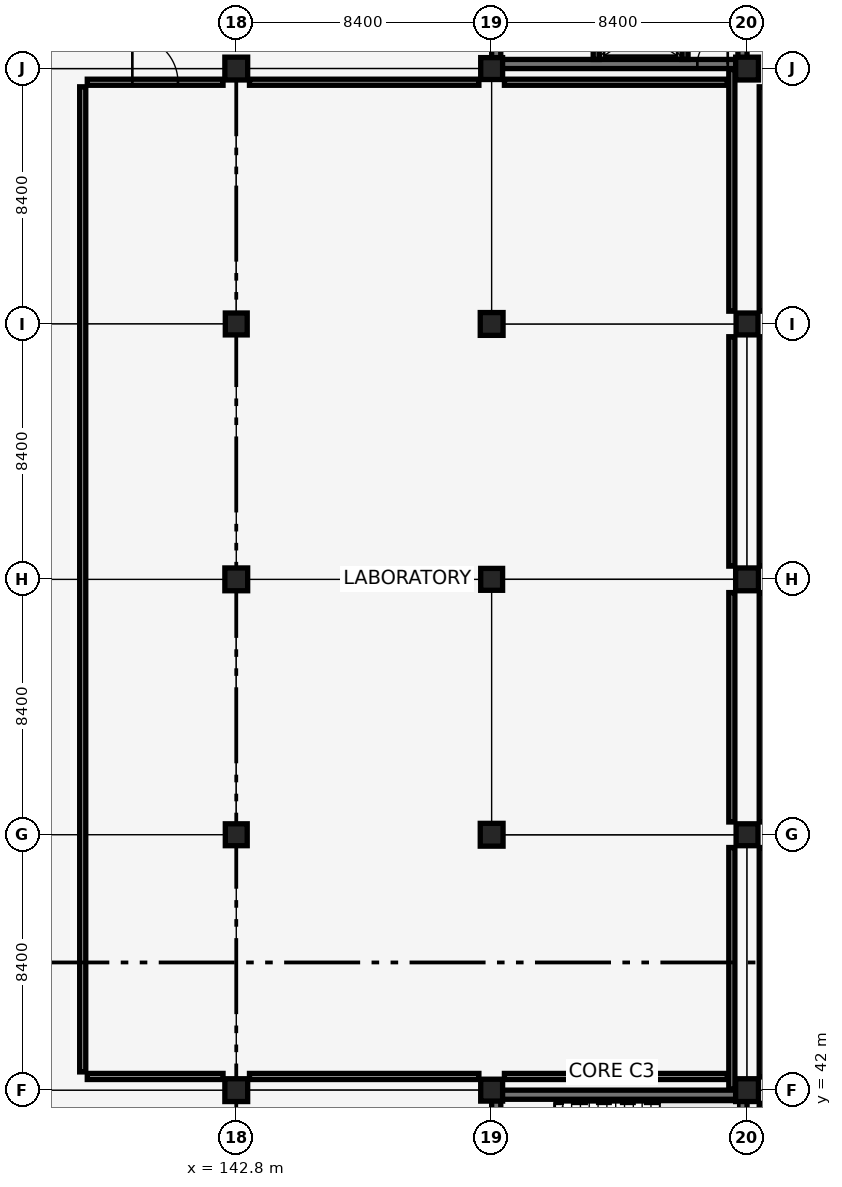
"""IFC4 building model, lengths in metres.
Left out: names, types, materials, properties, quantities, classifications, styles, units other than length and angle.
Written with IfcOpenShell. Run it as: python <this file> out.ifc"""

import sys

from ifc_helpers import new_model, si_unit, direction, frame, frame_2d, origin, origin_2d, place, context, subcontext, project, spatial, rectangle, extrude, element, fill, save


model = new_model("IFC4")
c1 = context("Model", 3, precision=1e-05, world=origin(), true_north=direction((0.0, 1.0)))
c2 = subcontext(c1, "Body", "Model", "MODEL_VIEW")
j1 = project(units=[si_unit("LENGTHUNIT", "METRE"), si_unit("PLANEANGLEUNIT", "RADIAN")], contexts=[c1])
p1 = place(None, origin())
s1 = spatial("IfcSite", under=j1, at=p1, CompositionType="ELEMENT")
p2 = place(p1, origin())
s2 = spatial("IfcBuilding", under=s1, at=p2, CompositionType="ELEMENT")
p3 = place(p2, frame((0.0, 0.0, 5.44)))
s3 = spatial("IfcBuildingStorey", under=s2, at=p3, CompositionType="ELEMENT", Elevation=5.44)
p4 = place(p3, frame((151.35, 41.85, 0.0), z_axis=(0.0, 0.0, 1.0), x_axis=(1.0, 0.0, 0.0)))
e1 = element("IfcWall", 1, at=p4, inside=s3, PredefinedType="SHEAR", context=c2, shape_type="SweptSolid", body=[
    extrude(rectangle(XDim=8.1, YDim=0.3, at=frame_2d((4.05, 0.0))), origin(), (0.0, 0.0, 1.0), 4.12),
])
p5 = place(p3, frame((151.35, 33.75, 0.0), z_axis=(0.0, 0.0, 1.0), x_axis=(0.0, 1.0, 0.0)))
e2 = element("IfcWall", 2, at=p5, inside=s3, PredefinedType="SHEAR", context=c2, shape_type="SweptSolid", body=[
    extrude(rectangle(XDim=8.1, YDim=0.3, at=frame_2d((4.05, 0.0))), origin(), (0.0, 0.0, 1.0), 4.12),
])
p6 = place(p5, frame((1.325, 0.0, 0.0)))
e3 = element("IfcOpeningElement", 3, at=p6, cuts=e2, PredefinedType="OPENING", context=c2, shape_type="SweptSolid", body=[
    extrude(rectangle(XDim=1.45, YDim=2.15, at=frame_2d((0.725, 1.075))), frame((0.0, 0.16, 0.0), z_axis=(0.0, -1.0, 0.0), x_axis=(1.0, 0.0, 0.0)), (0.0, 0.0, 1.0), 0.32),
])
p7 = place(p3, frame((159.45, 33.75, 0.0), z_axis=(0.0, 0.0, 1.0), x_axis=(0.0, 1.0, 0.0)))
e4 = element("IfcWall", 4, at=p7, inside=s3, PredefinedType="SHEAR", context=c2, shape_type="SweptSolid", body=[
    extrude(rectangle(XDim=8.1, YDim=0.3, at=frame_2d((4.05, 0.0))), origin(), (0.0, 0.0, 1.0), 4.12),
])
p8 = place(p3, frame((151.35, 75.75, 0.0), z_axis=(0.0, 0.0, 1.0), x_axis=(1.0, 0.0, 0.0)))
e5 = element("IfcWall", 5, at=p8, inside=s3, PredefinedType="SHEAR", context=c2, shape_type="SweptSolid", body=[
    extrude(rectangle(XDim=8.1, YDim=0.3, at=frame_2d((4.05, 0.0))), origin(), (0.0, 0.0, 1.0), 4.12),
])
p9 = place(p8, frame((6.615, 0.0, 0.0)))
e6 = element("IfcOpeningElement", 6, at=p9, cuts=e5, PredefinedType="OPENING", context=c2, shape_type="SweptSolid", body=[
    extrude(rectangle(XDim=1.0, YDim=2.15, at=frame_2d((0.5, 1.075))), frame((0.0, 0.16, 0.0), z_axis=(0.0, -1.0, 0.0), x_axis=(1.0, 0.0, 0.0)), (0.0, 0.0, 1.0), 0.32),
])
p10 = place(p3, frame((151.35, 75.75, 0.0), z_axis=(0.0, 0.0, 1.0), x_axis=(0.0, 1.0, 0.0)))
e7 = element("IfcWall", 7, at=p10, inside=s3, PredefinedType="SHEAR", context=c2, shape_type="SweptSolid", body=[
    extrude(rectangle(XDim=8.1, YDim=0.3, at=frame_2d((4.05, 0.0))), origin(), (0.0, 0.0, 1.0), 4.12),
])
p11 = place(p10, frame((1.325, 0.0, 0.0)))
e8 = element("IfcOpeningElement", 8, at=p11, cuts=e7, PredefinedType="OPENING", context=c2, shape_type="SweptSolid", body=[
    extrude(rectangle(XDim=1.45, YDim=2.15, at=frame_2d((0.725, 1.075))), frame((0.0, 0.16, 0.0), z_axis=(0.0, -1.0, 0.0), x_axis=(1.0, 0.0, 0.0)), (0.0, 0.0, 1.0), 0.32),
])
p12 = place(p3, frame((159.45, 75.75, 0.0), z_axis=(0.0, 0.0, 1.0), x_axis=(0.0, 1.0, 0.0)))
e9 = element("IfcWall", 9, at=p12, inside=s3, PredefinedType="SHEAR", context=c2, shape_type="SweptSolid", body=[
    extrude(rectangle(XDim=8.1, YDim=0.3, at=frame_2d((4.05, 0.0))), origin(), (0.0, 0.0, 1.0), 4.12),
])
p13 = place(p3, frame((142.8, 42.0, 0.0), z_axis=(0.0, 0.0, 1.0), x_axis=(1.0, 0.0, 0.0)))
e10 = element("IfcColumn", 10, at=p13, inside=s3, PredefinedType="COLUMN", context=c2, shape_type="SweptSolid", body=[
    extrude(rectangle(XDim=0.75, YDim=0.75, at=origin_2d()), origin(), (0.0, 0.0, 1.0), 4.12),
])
p14 = place(p3, frame((142.8, 50.4, 0.0), z_axis=(0.0, 0.0, 1.0), x_axis=(1.0, 0.0, 0.0)))
e11 = element("IfcColumn", 11, at=p14, inside=s3, PredefinedType="COLUMN", context=c2, shape_type="SweptSolid", body=[
    extrude(rectangle(XDim=0.72, YDim=0.72, at=origin_2d()), origin(), (0.0, 0.0, 1.0), 4.12),
])
p15 = place(p3, frame((142.8, 58.8, 0.0), z_axis=(0.0, 0.0, 1.0), x_axis=(1.0, 0.0, 0.0)))
e12 = element("IfcColumn", 12, at=p15, inside=s3, PredefinedType="COLUMN", context=c2, shape_type="SweptSolid", body=[
    extrude(rectangle(XDim=0.75, YDim=0.75, at=origin_2d()), origin(), (0.0, 0.0, 1.0), 4.12),
])
p16 = place(p3, frame((142.8, 67.2, 0.0), z_axis=(0.0, 0.0, 1.0), x_axis=(1.0, 0.0, 0.0)))
e13 = element("IfcColumn", 13, at=p16, inside=s3, PredefinedType="COLUMN", context=c2, shape_type="SweptSolid", body=[
    extrude(rectangle(XDim=0.72, YDim=0.72, at=origin_2d()), origin(), (0.0, 0.0, 1.0), 4.12),
])
p17 = place(p3, frame((142.8, 75.6, 0.0), z_axis=(0.0, 0.0, 1.0), x_axis=(1.0, 0.0, 0.0)))
e14 = element("IfcColumn", 14, at=p17, inside=s3, PredefinedType="COLUMN", context=c2, shape_type="SweptSolid", body=[
    extrude(rectangle(XDim=0.75, YDim=0.75, at=origin_2d()), origin(), (0.0, 0.0, 1.0), 4.12),
])
p18 = place(p3, frame((151.2, 42.0, 0.0), z_axis=(0.0, 0.0, 1.0), x_axis=(1.0, 0.0, 0.0)))
e15 = element("IfcColumn", 15, at=p18, inside=s3, PredefinedType="COLUMN", context=c2, shape_type="SweptSolid", body=[
    extrude(rectangle(XDim=0.72, YDim=0.72, at=origin_2d()), origin(), (0.0, 0.0, 1.0), 4.12),
])
p19 = place(p3, frame((151.2, 50.4, 0.0), z_axis=(0.0, 0.0, 1.0), x_axis=(1.0, 0.0, 0.0)))
e16 = element("IfcColumn", 16, at=p19, inside=s3, PredefinedType="COLUMN", context=c2, shape_type="SweptSolid", body=[
    extrude(rectangle(XDim=0.75, YDim=0.75, at=origin_2d()), origin(), (0.0, 0.0, 1.0), 4.12),
])
p20 = place(p3, frame((151.2, 58.8, 0.0), z_axis=(0.0, 0.0, 1.0), x_axis=(1.0, 0.0, 0.0)))
e17 = element("IfcColumn", 17, at=p20, inside=s3, PredefinedType="COLUMN", context=c2, shape_type="SweptSolid", body=[
    extrude(rectangle(XDim=0.72, YDim=0.72, at=origin_2d()), origin(), (0.0, 0.0, 1.0), 4.12),
])
p21 = place(p3, frame((151.2, 67.2, 0.0), z_axis=(0.0, 0.0, 1.0), x_axis=(1.0, 0.0, 0.0)))
e18 = element("IfcColumn", 18, at=p21, inside=s3, PredefinedType="COLUMN", context=c2, shape_type="SweptSolid", body=[
    extrude(rectangle(XDim=0.75, YDim=0.75, at=origin_2d()), origin(), (0.0, 0.0, 1.0), 4.12),
])
p22 = place(p3, frame((151.2, 75.6, 0.0), z_axis=(0.0, 0.0, 1.0), x_axis=(1.0, 0.0, 0.0)))
e19 = element("IfcColumn", 19, at=p22, inside=s3, PredefinedType="COLUMN", context=c2, shape_type="SweptSolid", body=[
    extrude(rectangle(XDim=0.72, YDim=0.72, at=origin_2d()), origin(), (0.0, 0.0, 1.0), 4.12),
])
p23 = place(p3, frame((159.6, 42.0, 0.0), z_axis=(0.0, 0.0, 1.0), x_axis=(1.0, 0.0, 0.0)))
e20 = element("IfcColumn", 20, at=p23, inside=s3, PredefinedType="COLUMN", context=c2, shape_type="SweptSolid", body=[
    extrude(rectangle(XDim=0.75, YDim=0.75, at=origin_2d()), origin(), (0.0, 0.0, 1.0), 4.12),
])
p24 = place(p3, frame((159.6, 50.4, 0.0), z_axis=(0.0, 0.0, 1.0), x_axis=(1.0, 0.0, 0.0)))
e21 = element("IfcColumn", 21, at=p24, inside=s3, PredefinedType="COLUMN", context=c2, shape_type="SweptSolid", body=[
    extrude(rectangle(XDim=0.72, YDim=0.72, at=origin_2d()), origin(), (0.0, 0.0, 1.0), 4.12),
])
p25 = place(p3, frame((159.6, 58.8, 0.0), z_axis=(0.0, 0.0, 1.0), x_axis=(1.0, 0.0, 0.0)))
e22 = element("IfcColumn", 22, at=p25, inside=s3, PredefinedType="COLUMN", context=c2, shape_type="SweptSolid", body=[
    extrude(rectangle(XDim=0.75, YDim=0.75, at=origin_2d()), origin(), (0.0, 0.0, 1.0), 4.12),
])
p26 = place(p3, frame((159.6, 67.2, 0.0), z_axis=(0.0, 0.0, 1.0), x_axis=(1.0, 0.0, 0.0)))
e23 = element("IfcColumn", 23, at=p26, inside=s3, PredefinedType="COLUMN", context=c2, shape_type="SweptSolid", body=[
    extrude(rectangle(XDim=0.72, YDim=0.72, at=origin_2d()), origin(), (0.0, 0.0, 1.0), 4.12),
])
p27 = place(p3, frame((159.6, 75.6, 0.0), z_axis=(0.0, 0.0, 1.0), x_axis=(1.0, 0.0, 0.0)))
e24 = element("IfcColumn", 24, at=p27, inside=s3, PredefinedType="COLUMN", context=c2, shape_type="SweptSolid", body=[
    extrude(rectangle(XDim=0.75, YDim=0.75, at=origin_2d()), origin(), (0.0, 0.0, 1.0), 4.12),
])
p28 = place(p3, frame((154.64, 75.9, 0.0), z_axis=(0.0, 0.0, 1.0), x_axis=(0.0, 1.0, 0.0)))
e25 = element("IfcWall", 25, at=p28, inside=s3, PredefinedType="SHEAR", context=c2, shape_type="SweptSolid", body=[
    extrude(rectangle(XDim=3.8, YDim=0.2, at=frame_2d((1.9, 0.0))), origin(), (0.0, 0.0, 1.0), 3.44),
])
p29 = place(p28, frame((0.375, 0.0, 0.0)))
e26 = element("IfcOpeningElement", 26, at=p29, cuts=e25, PredefinedType="OPENING", context=c2, shape_type="SweptSolid", body=[
    extrude(rectangle(XDim=1.1, YDim=2.15, at=frame_2d((0.55, 1.075))), frame((0.0, 0.11, 0.0), z_axis=(0.0, -1.0, 0.0), x_axis=(1.0, 0.0, 0.0)), (0.0, 0.0, 1.0), 0.22),
])
p30 = place(p28, frame((2.325, 0.0, 0.0)))
e27 = element("IfcOpeningElement", 27, at=p30, cuts=e25, PredefinedType="OPENING", context=c2, shape_type="SweptSolid", body=[
    extrude(rectangle(XDim=1.1, YDim=2.15, at=frame_2d((0.55, 1.075))), frame((0.0, 0.11, 0.0), z_axis=(0.0, -1.0, 0.0), x_axis=(1.0, 0.0, 0.0)), (0.0, 0.0, 1.0), 0.22),
])
p31 = place(p3, frame((157.56, 75.9, 0.0), z_axis=(0.0, 0.0, 1.0), x_axis=(0.0, 1.0, 0.0)))
e28 = element("IfcWall", 28, at=p31, inside=s3, PredefinedType="SHEAR", context=c2, shape_type="SweptSolid", body=[
    extrude(rectangle(XDim=3.8, YDim=0.2, at=frame_2d((1.9, 0.0))), origin(), (0.0, 0.0, 1.0), 3.44),
])
p32 = place(p3, frame((137.9, 75.15, 0.0), z_axis=(0.0, 0.0, 1.0), x_axis=(1.0, 0.0, 0.0)))
e29 = element("IfcWall", 29, at=p32, inside=s3, PredefinedType="PARTITIONING", context=c2, shape_type="SweptSolid", body=[
    extrude(rectangle(XDim=4.465, YDim=0.2, at=frame_2d((2.232, 0.0))), origin(), (0.0, 0.0, 1.0), 4.12),
])
p33 = place(p32, frame((1.482, 0.0, 0.0)))
e30 = element("IfcOpeningElement", 30, at=p33, cuts=e29, PredefinedType="OPENING", context=c2, shape_type="SweptSolid", body=[
    extrude(rectangle(XDim=1.5, YDim=2.2, at=frame_2d((0.75, 1.1))), frame((0.0, 0.11, 0.0), z_axis=(0.0, -1.0, 0.0), x_axis=(1.0, 0.0, 0.0)), (0.0, 0.0, 1.0), 0.22),
])
p34 = place(p3, frame((143.235, 75.15, 0.0), z_axis=(0.0, 0.0, 1.0), x_axis=(1.0, 0.0, 0.0)))
e31 = element("IfcWall", 31, at=p34, inside=s3, PredefinedType="PARTITIONING", context=c2, shape_type="SweptSolid", body=[
    extrude(rectangle(XDim=7.545, YDim=0.2, at=frame_2d((3.772, 0.0))), origin(), (0.0, 0.0, 1.0), 4.12),
])
p35 = place(p3, frame((151.62, 75.15, 0.0), z_axis=(0.0, 0.0, 1.0), x_axis=(1.0, 0.0, 0.0)))
e32 = element("IfcWall", 32, at=p35, inside=s3, PredefinedType="PARTITIONING", context=c2, shape_type="SweptSolid", body=[
    extrude(rectangle(XDim=7.33, YDim=0.2, at=frame_2d((3.665, 0.0))), origin(), (0.0, 0.0, 1.0), 4.12),
])
p36 = place(p3, frame((137.75, 42.6, 0.0), z_axis=(0.0, 0.0, 1.0), x_axis=(0.0, 1.0, 0.0)))
e33 = element("IfcWall", 33, at=p36, inside=s3, PredefinedType="PARTITIONING", context=c2, shape_type="SweptSolid", body=[
    extrude(rectangle(XDim=32.4, YDim=0.2, at=frame_2d((16.2, 0.0))), origin(), (0.0, 0.0, 1.0), 3.34),
])
p37 = place(p3, frame((137.9, 42.45, 0.0), z_axis=(0.0, 0.0, 1.0), x_axis=(1.0, 0.0, 0.0)))
e34 = element("IfcWall", 34, at=p37, inside=s3, PredefinedType="PARTITIONING", context=c2, shape_type="SweptSolid", body=[
    extrude(rectangle(XDim=4.465, YDim=0.2, at=frame_2d((2.232, 0.0))), origin(), (0.0, 0.0, 1.0), 4.12),
])
p38 = place(p3, frame((143.235, 42.45, 0.0), z_axis=(0.0, 0.0, 1.0), x_axis=(1.0, 0.0, 0.0)))
e35 = element("IfcWall", 35, at=p38, inside=s3, PredefinedType="PARTITIONING", context=c2, shape_type="SweptSolid", body=[
    extrude(rectangle(XDim=7.545, YDim=0.2, at=frame_2d((3.772, 0.0))), origin(), (0.0, 0.0, 1.0), 4.12),
])
p39 = place(p3, frame((151.62, 42.45, 0.0), z_axis=(0.0, 0.0, 1.0), x_axis=(1.0, 0.0, 0.0)))
e36 = element("IfcWall", 36, at=p39, inside=s3, PredefinedType="PARTITIONING", context=c2, shape_type="SweptSolid", body=[
    extrude(rectangle(XDim=7.33, YDim=0.2, at=frame_2d((3.665, 0.0))), origin(), (0.0, 0.0, 1.0), 4.12),
])
p40 = place(p3, frame((159.1, 42.03, 0.0), z_axis=(0.0, 0.0, 1.0), x_axis=(0.0, 1.0, 0.0)))
e37 = element("IfcWall", 37, at=p40, inside=s3, PredefinedType="PARTITIONING", context=c2, shape_type="SweptSolid", body=[
    extrude(rectangle(XDim=7.95, YDim=0.2, at=frame_2d((3.975, 0.0))), origin(), (0.0, 0.0, 1.0), 3.44),
])
p41 = place(p3, frame((159.1, 50.82, 0.0), z_axis=(0.0, 0.0, 1.0), x_axis=(0.0, 1.0, 0.0)))
e38 = element("IfcWall", 38, at=p41, inside=s3, PredefinedType="PARTITIONING", context=c2, shape_type="SweptSolid", body=[
    extrude(rectangle(XDim=7.545, YDim=0.2, at=frame_2d((3.772, 0.0))), origin(), (0.0, 0.0, 1.0), 3.6),
])
p42 = place(p3, frame((159.1, 59.235, 0.0), z_axis=(0.0, 0.0, 1.0), x_axis=(0.0, 1.0, 0.0)))
e39 = element("IfcWall", 39, at=p42, inside=s3, PredefinedType="PARTITIONING", context=c2, shape_type="SweptSolid", body=[
    extrude(rectangle(XDim=7.545, YDim=0.2, at=frame_2d((3.772, 0.0))), origin(), (0.0, 0.0, 1.0), 3.62),
])
p43 = place(p3, frame((159.1, 67.62, 0.0), z_axis=(0.0, 0.0, 1.0), x_axis=(0.0, 1.0, 0.0)))
e40 = element("IfcWall", 40, at=p43, inside=s3, PredefinedType="PARTITIONING", context=c2, shape_type="SweptSolid", body=[
    extrude(rectangle(XDim=7.95, YDim=0.2, at=frame_2d((3.975, 0.0))), origin(), (0.0, 0.0, 1.0), 3.44),
])
p44 = place(p3, frame((160.1, 34.2, 0.0), z_axis=(0.0, 0.0, 1.0), x_axis=(0.0, 1.0, 0.0)))
e41 = element("IfcWall", 41, at=p44, inside=s3, PredefinedType="PARTITIONING", context=c2, shape_type="SweptSolid", body=[
    extrude(rectangle(XDim=7.365, YDim=0.2, at=frame_2d((3.683, 0.0))), origin(), (0.0, 0.0, 1.0), 3.62),
])
p45 = place(p3, frame((160.1, 42.435, 0.0), z_axis=(0.0, 0.0, 1.0), x_axis=(0.0, 1.0, 0.0)))
e42 = element("IfcWall", 42, at=p45, inside=s3, PredefinedType="PARTITIONING", context=c2, shape_type="SweptSolid", body=[
    extrude(rectangle(XDim=7.545, YDim=0.2, at=frame_2d((3.772, 0.0))), origin(), (0.0, 0.0, 1.0), 3.6),
])
p46 = place(p3, frame((160.1, 50.82, 0.0), z_axis=(0.0, 0.0, 1.0), x_axis=(0.0, 1.0, 0.0)))
e43 = element("IfcWall", 43, at=p46, inside=s3, PredefinedType="PARTITIONING", context=c2, shape_type="SweptSolid", body=[
    extrude(rectangle(XDim=7.545, YDim=0.2, at=frame_2d((3.772, 0.0))), origin(), (0.0, 0.0, 1.0), 3.62),
])
p47 = place(p3, frame((160.1, 59.235, 0.0), z_axis=(0.0, 0.0, 1.0), x_axis=(0.0, 1.0, 0.0)))
e44 = element("IfcWall", 44, at=p47, inside=s3, PredefinedType="PARTITIONING", context=c2, shape_type="SweptSolid", body=[
    extrude(rectangle(XDim=7.545, YDim=0.2, at=frame_2d((3.772, 0.0))), origin(), (0.0, 0.0, 1.0), 3.6),
])
p48 = place(p3, frame((160.1, 67.62, 0.0), z_axis=(0.0, 0.0, 1.0), x_axis=(0.0, 1.0, 0.0)))
e45 = element("IfcWall", 45, at=p48, inside=s3, PredefinedType="PARTITIONING", context=c2, shape_type="SweptSolid", body=[
    extrude(rectangle(XDim=7.38, YDim=0.2, at=frame_2d((3.69, 0.0))), origin(), (0.0, 0.0, 1.0), 3.62),
])
p49 = place(p9, origin())
e46 = element("IfcDoor", 46, at=p49, inside=s3, OperationType="SINGLE_SWING_RIGHT", PredefinedType="DOOR", context=c2, shape_type="SweptSolid", body=[
    extrude(rectangle(XDim=1.0, YDim=2.15, at=frame_2d((0.5, 1.075))), frame((0.0, 0.025, 0.0), z_axis=(0.0, -1.0, 0.0), x_axis=(1.0, 0.0, 0.0)), (0.0, 0.0, 1.0), 0.05),
])
fill(e6, e46)
p50 = place(p33, origin())
e47 = element("IfcDoor", 47, at=p50, inside=s3, OperationType="DOUBLE_DOOR_SINGLE_SWING", PredefinedType="DOOR", context=c2, shape_type="SweptSolid", body=[
    extrude(rectangle(XDim=1.5, YDim=2.2, at=frame_2d((0.75, 1.1))), frame((0.0, 0.025, 0.0), z_axis=(0.0, -1.0, 0.0), x_axis=(1.0, 0.0, 0.0)), (0.0, 0.0, 1.0), 0.05),
])
fill(e30, e47)
save(model, sys.argv[1])
